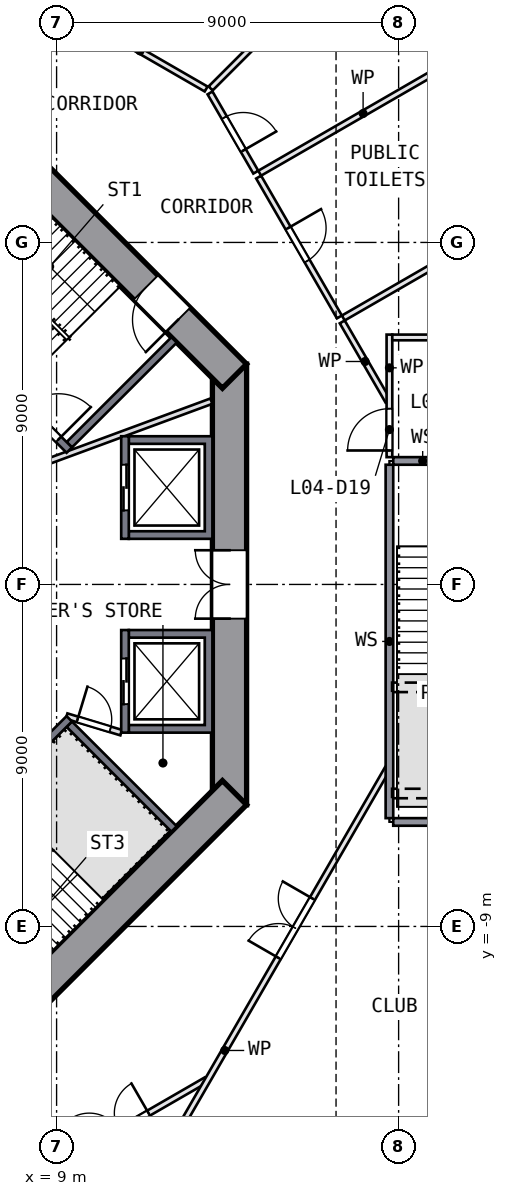
"""IFC4 building model, lengths in metres.
Left out: names, types, materials, properties, quantities, classifications, styles, units other than length and angle.
Written with IfcOpenShell. Run it as: python <this file> out.ifc"""

import sys

from ifc_helpers import new_model, si_unit, direction, frame, frame_2d, origin, place, context, subcontext, project, spatial, polyline, rectangle, outline, extrude, element, fill, save


model = new_model("IFC4")
c1 = context("Model", 3, precision=1e-05, world=origin(), true_north=direction((0.0, 1.0)))
c2 = subcontext(c1, "Body", "Model", "MODEL_VIEW")
j1 = project(units=[si_unit("LENGTHUNIT", "METRE"), si_unit("PLANEANGLEUNIT", "RADIAN")], contexts=[c1])
p1 = place(None, origin())
s1 = spatial("IfcSite", under=j1, at=p1, CompositionType="ELEMENT")
p2 = place(p1, origin())
s2 = spatial("IfcBuilding", under=s1, at=p2, CompositionType="ELEMENT")
p3 = place(p2, frame((0.0, 0.0, 23.5)))
s3 = spatial("IfcBuildingStorey", under=s2, at=p3, CompositionType="ELEMENT", Elevation=23.5)
p4 = place(p3, frame((13.55, -5.799, 0.0), z_axis=(0.0, 0.0, 1.0), x_axis=(0.0, 1.0, 0.0)))
e1 = element("IfcWall", 1, at=p4, inside=s3, PredefinedType="SHEAR", context=c2, shape_type="SweptSolid", body=[
    extrude(rectangle(XDim=11.598, YDim=0.9, at=frame_2d((5.799, 0.0))), origin(), (0.0, 0.0, 1.0), 4.5),
])
p5 = place(p4, frame((4.899, 0.0, 0.0)))
e2 = element("IfcOpeningElement", 2, at=p5, cuts=e1, PredefinedType="OPENING", context=c2, shape_type="SweptSolid", body=[
    extrude(rectangle(XDim=1.8, YDim=2.1, at=frame_2d((0.9, 1.05))), frame((0.0, 0.46, 0.0), z_axis=(0.0, -1.0, 0.0), x_axis=(1.0, 0.0, 0.0)), (0.0, 0.0, 1.0), 0.92),
])
p6 = place(p3, frame((13.682, 5.481, 0.0), z_axis=(0.0, 0.0, 1.0), x_axis=(-0.707106781, 0.707106781, 0.0)))
e3 = element("IfcWall", 3, at=p6, inside=s3, PredefinedType="SHEAR", context=c2, shape_type="SweptSolid", body=[
    extrude(rectangle(XDim=11.598, YDim=0.9, at=frame_2d((5.799, 0.0))), origin(), (0.0, 0.0, 1.0), 4.5),
])
p7 = place(p6, frame((2.099, 0.0, 0.0)))
e4 = element("IfcOpeningElement", 4, at=p7, cuts=e3, PredefinedType="OPENING", context=c2, shape_type="SweptSolid", body=[
    extrude(rectangle(XDim=1.2, YDim=2.1, at=frame_2d((0.6, 1.05))), frame((0.0, 0.46, 0.0), z_axis=(0.0, -1.0, 0.0), x_axis=(1.0, 0.0, 0.0)), (0.0, 0.0, 1.0), 0.92),
])
p8 = place(p3, frame((5.481, -13.682, 0.0), z_axis=(0.0, 0.0, 1.0), x_axis=(0.707106781, 0.707106781, 0.0)))
e5 = element("IfcWall", 5, at=p8, inside=s3, PredefinedType="SHEAR", context=c2, shape_type="SweptSolid", body=[
    extrude(rectangle(XDim=11.598, YDim=0.9, at=frame_2d((5.799, 0.0))), origin(), (0.0, 0.0, 1.0), 4.5),
])
p9 = place(p8, frame((2.099, 0.0, 0.0)))
e6 = element("IfcOpeningElement", 6, at=p9, cuts=e5, PredefinedType="OPENING", context=c2, shape_type="SweptSolid", body=[
    extrude(rectangle(XDim=1.2, YDim=2.1, at=frame_2d((0.6, 1.05))), frame((0.0, 0.46, 0.0), z_axis=(0.0, -1.0, 0.0), x_axis=(1.0, 0.0, 0.0)), (0.0, 0.0, 1.0), 0.92),
])
p10 = place(p3, frame((24.118, 6.603, 0.0), z_axis=(0.0, 0.0, 1.0), x_axis=(-0.499997984, 0.866026568, 0.0)))
e7 = element("IfcWall", 7, at=p10, inside=s3, PredefinedType="SOLIDWALL", context=c2, shape_type="SweptSolid", body=[
    extrude(rectangle(XDim=12.962, YDim=0.14, at=frame_2d((6.481, 0.0))), origin(), (0.0, 0.0, 1.0), 4.0),
])
p11 = place(p3, origin())
e8 = element("IfcWall", 8, at=p11, inside=s3, PredefinedType="SOLIDWALL", context=c2, shape_type="SweptSolid", body=[
    extrude(outline(polyline([(13.1, -3.9), (10.9, -3.9), (10.9, -3.7), (12.9, -3.7), (12.9, -1.4), (10.9, -1.4), (10.9, -1.2), (13.1, -1.2), (13.1, -3.9)])), origin(), (0.0, 0.0, 1.0), 4.0),
])
p12 = place(p3, frame((10.8, -1.2, 0.0), z_axis=(0.0, 0.0, 1.0), x_axis=(0.0, -1.0, 0.0)))
e9 = element("IfcWall", 9, at=p12, inside=s3, PredefinedType="SOLIDWALL", context=c2, shape_type="SweptSolid", body=[
    extrude(rectangle(XDim=2.7, YDim=0.2, at=frame_2d((1.35, 0.0))), origin(), (0.0, 0.0, 1.0), 4.0),
])
p13 = place(p12, frame((0.75, 0.0, 0.0)))
e10 = element("IfcOpeningElement", 10, at=p13, cuts=e9, PredefinedType="OPENING", context=c2, shape_type="SweptSolid", body=[
    extrude(rectangle(XDim=1.2, YDim=2.1, at=frame_2d((0.6, 1.05))), frame((0.0, 0.11, 0.0), z_axis=(0.0, -1.0, 0.0), x_axis=(1.0, 0.0, 0.0)), (0.0, 0.0, 1.0), 0.22),
])
p14 = place(p3, origin())
e11 = element("IfcWall", 11, at=p14, inside=s3, PredefinedType="SOLIDWALL", context=c2, shape_type="SweptSolid", body=[
    extrude(outline(polyline([(13.1, 3.9), (13.1, 1.2), (10.9, 1.2), (10.9, 1.4), (12.9, 1.4), (12.9, 3.7), (10.9, 3.7), (10.9, 3.9), (13.1, 3.9)])), origin(), (0.0, 0.0, 1.0), 4.0),
])
p15 = place(p3, frame((10.8, 1.2, 0.0), z_axis=(0.0, 0.0, 1.0), x_axis=(0.0, 1.0, 0.0)))
e12 = element("IfcWall", 12, at=p15, inside=s3, PredefinedType="SOLIDWALL", context=c2, shape_type="SweptSolid", body=[
    extrude(rectangle(XDim=2.7, YDim=0.2, at=frame_2d((1.35, 0.0))), origin(), (0.0, 0.0, 1.0), 4.0),
])
p16 = place(p15, frame((0.75, 0.0, 0.0)))
e13 = element("IfcOpeningElement", 13, at=p16, cuts=e12, PredefinedType="OPENING", context=c2, shape_type="SweptSolid", body=[
    extrude(rectangle(XDim=1.2, YDim=2.1, at=frame_2d((0.6, 1.05))), frame((0.0, 0.11, 0.0), z_axis=(0.0, -1.0, 0.0), x_axis=(1.0, 0.0, 0.0)), (0.0, 0.0, 1.0), 0.22),
])
p17 = place(p3, frame((3.535, 9.334, 0.0), z_axis=(0.0, 0.0, 1.0), x_axis=(0.707106781, -0.707106781, 0.0)))
e14 = element("IfcWall", 14, at=p17, inside=s3, PredefinedType="SOLIDWALL", context=c2, shape_type="SweptSolid", body=[
    extrude(rectangle(XDim=8.2, YDim=0.2, at=frame_2d((4.1, 0.0))), origin(), (0.0, 0.0, 1.0), 4.0),
])
p18 = place(p17, frame((6.6, 0.0, 0.0)))
e15 = element("IfcOpeningElement", 15, at=p18, cuts=e14, PredefinedType="OPENING", context=c2, shape_type="SweptSolid", body=[
    extrude(rectangle(XDim=1.2, YDim=2.1, at=frame_2d((0.6, 1.05))), frame((0.0, 0.11, 0.0), z_axis=(0.0, -1.0, 0.0), x_axis=(1.0, 0.0, 0.0)), (0.0, 0.0, 1.0), 0.22),
])
p19 = place(p3, frame((9.334, 3.677, 0.0), z_axis=(0.0, 0.0, 1.0), x_axis=(0.707106781, 0.707106781, 0.0)))
e16 = element("IfcWall", 16, at=p19, inside=s3, PredefinedType="SOLIDWALL", context=c2, shape_type="SweptSolid", body=[
    extrude(rectangle(XDim=3.9, YDim=0.2, at=frame_2d((1.95, 0.0))), origin(), (0.0, 0.0, 1.0), 4.0),
])
p20 = place(p3, frame((9.334, -3.535, 0.0), z_axis=(0.0, 0.0, 1.0), x_axis=(-0.707106781, -0.707106781, 0.0)))
e17 = element("IfcWall", 17, at=p20, inside=s3, PredefinedType="SOLIDWALL", context=c2, shape_type="SweptSolid", body=[
    extrude(rectangle(XDim=8.2, YDim=0.2, at=frame_2d((4.1, 0.0))), origin(), (0.0, 0.0, 1.0), 4.0),
])
p21 = place(p20, frame((6.6, 0.0, 0.0)))
e18 = element("IfcOpeningElement", 18, at=p21, cuts=e17, PredefinedType="OPENING", context=c2, shape_type="SweptSolid", body=[
    extrude(rectangle(XDim=1.2, YDim=2.1, at=frame_2d((0.6, 1.05))), frame((0.0, 0.11, 0.0), z_axis=(0.0, -1.0, 0.0), x_axis=(1.0, 0.0, 0.0)), (0.0, 0.0, 1.0), 0.22),
])
p22 = place(p3, frame((9.334, -3.677, 0.0), z_axis=(0.0, 0.0, 1.0), x_axis=(0.707106781, -0.707106781, 0.0)))
e19 = element("IfcWall", 19, at=p22, inside=s3, PredefinedType="SOLIDWALL", context=c2, shape_type="SweptSolid", body=[
    extrude(rectangle(XDim=3.9, YDim=0.2, at=frame_2d((1.95, 0.0))), origin(), (0.0, 0.0, 1.0), 4.0),
])
p23 = place(p3, frame((9.263, -3.465, 0.0), z_axis=(0.0, 0.0, 1.0), x_axis=(0.957084567, -0.289808785, 0.0)))
e20 = element("IfcWall", 20, at=p23, inside=s3, PredefinedType="PARTITIONING", context=c2, shape_type="SweptSolid", body=[
    extrude(rectangle(XDim=1.501, YDim=0.15, at=frame_2d((0.75, 0.0))), origin(), (0.0, 0.0, 1.0), 4.0),
])
p24 = place(p23, frame((0.301, 0.0, 0.0)))
e21 = element("IfcOpeningElement", 21, at=p24, cuts=e20, PredefinedType="OPENING", context=c2, shape_type="SweptSolid", body=[
    extrude(rectangle(XDim=0.9, YDim=2.1, at=frame_2d((0.45, 1.05))), frame((0.0, 0.085, 0.0), z_axis=(0.0, -1.0, 0.0), x_axis=(1.0, 0.0, 0.0)), (0.0, 0.0, 1.0), 0.17),
])
p25 = place(p3, frame((4.813, 1.776, 0.0), z_axis=(0.0, 0.0, 1.0), x_axis=(0.93819293, 0.346112737, 0.0)))
e22 = element("IfcWall", 22, at=p25, inside=s3, PredefinedType="PARTITIONING", context=c2, shape_type="SweptSolid", body=[
    extrude(rectangle(XDim=8.803, YDim=0.15, at=frame_2d((4.402, 0.0))), origin(), (0.0, 0.0, 1.0), 4.0),
])
p26 = place(p25, frame((1.4, 0.0, 0.0)))
e23 = element("IfcOpeningElement", 23, at=p26, cuts=e22, PredefinedType="OPENING", context=c2, shape_type="SweptSolid", body=[
    extrude(rectangle(XDim=1.8, YDim=2.1, at=frame_2d((0.9, 1.05))), frame((0.0, 0.085, 0.0), z_axis=(0.0, -1.0, 0.0), x_axis=(1.0, 0.0, 0.0)), (0.0, 0.0, 1.0), 0.17),
])
p27 = place(p3, frame((4.823, 17.721, 0.0), z_axis=(0.0, 0.0, 1.0), x_axis=(0.866037142, -0.499979668, 0.0)))
e24 = element("IfcWall", 24, at=p27, inside=s3, PredefinedType="PARTITIONING", context=c2, shape_type="SweptSolid", body=[
    extrude(rectangle(XDim=9.367, YDim=0.15, at=frame_2d((4.683, 0.0))), origin(), (0.0, 0.0, 1.0), 4.0),
])
p28 = place(p27, frame((4.15, 0.0, 0.0)))
e25 = element("IfcOpeningElement", 25, at=p28, cuts=e24, PredefinedType="OPENING", context=c2, shape_type="SweptSolid", body=[
    extrude(rectangle(XDim=1.0, YDim=2.1, at=frame_2d((0.5, 1.05))), frame((0.0, 0.085, 0.0), z_axis=(0.0, -1.0, 0.0), x_axis=(1.0, 0.0, 0.0)), (0.0, 0.0, 1.0), 0.17),
])
p29 = place(p3, frame((4.823, -17.721, 0.0), z_axis=(0.0, 0.0, 1.0), x_axis=(0.866037142, 0.499979668, 0.0)))
e26 = element("IfcWall", 26, at=p29, inside=s3, PredefinedType="PARTITIONING", context=c2, shape_type="SweptSolid", body=[
    extrude(rectangle(XDim=9.367, YDim=0.15, at=frame_2d((4.683, 0.0))), origin(), (0.0, 0.0, 1.0), 4.0),
])
p30 = place(p29, frame((5.817, 0.0, 0.0)))
e27 = element("IfcOpeningElement", 27, at=p30, cuts=e26, PredefinedType="OPENING", context=c2, shape_type="SweptSolid", body=[
    extrude(rectangle(XDim=1.8, YDim=2.1, at=frame_2d((0.9, 1.05))), frame((0.0, 0.085, 0.0), z_axis=(0.0, -1.0, 0.0), x_axis=(1.0, 0.0, 0.0)), (0.0, 0.0, 1.0), 0.17),
])
p31 = place(p3, frame((13.038, 12.935, 0.0), z_axis=(0.0, 0.0, 1.0), x_axis=(0.499933044, -0.866064057, 0.0)))
e28 = element("IfcWall", 28, at=p31, inside=s3, PredefinedType="PARTITIONING", context=c2, shape_type="SweptSolid", body=[
    extrude(rectangle(XDim=2.408, YDim=0.15, at=frame_2d((1.204, 0.0))), origin(), (0.0, 0.0, 1.0), 4.0),
])
p32 = place(p31, frame((0.75, 0.0, 0.0)))
e29 = element("IfcOpeningElement", 29, at=p32, cuts=e28, PredefinedType="OPENING", context=c2, shape_type="SweptSolid", body=[
    extrude(rectangle(XDim=1.0, YDim=2.1, at=frame_2d((0.5, 1.05))), frame((0.0, 0.085, 0.0), z_axis=(0.0, -1.0, 0.0), x_axis=(1.0, 0.0, 0.0)), (0.0, 0.0, 1.0), 0.17),
])
p33 = place(p3, frame((14.317, 10.719, 0.0), z_axis=(0.0, 0.0, 1.0), x_axis=(0.500037366, -0.866003829, 0.0)))
e30 = element("IfcWall", 30, at=p33, inside=s3, PredefinedType="PARTITIONING", context=c2, shape_type="SweptSolid", body=[
    extrude(rectangle(XDim=4.25, YDim=0.15, at=frame_2d((2.125, 0.0))), origin(), (0.0, 0.0, 1.0), 4.0),
])
p34 = place(p33, frame((1.55, 0.0, 0.0)))
e31 = element("IfcOpeningElement", 31, at=p34, cuts=e30, PredefinedType="OPENING", context=c2, shape_type="SweptSolid", body=[
    extrude(rectangle(XDim=1.0, YDim=2.1, at=frame_2d((0.5, 1.05))), frame((0.0, 0.085, 0.0), z_axis=(0.0, -1.0, 0.0), x_axis=(1.0, 0.0, 0.0)), (0.0, 0.0, 1.0), 0.17),
])
p35 = place(p3, frame((16.517, 6.909, 0.0), z_axis=(0.0, 0.0, 1.0), x_axis=(0.499933044, -0.866064057, 0.0)))
e32 = element("IfcWall", 32, at=p35, inside=s3, PredefinedType="PARTITIONING", context=c2, shape_type="SweptSolid", body=[
    extrude(rectangle(XDim=2.408, YDim=0.15, at=frame_2d((1.204, 0.0))), origin(), (0.0, 0.0, 1.0), 4.0),
])
p36 = place(p3, frame((17.858, -6.25, 0.0), z_axis=(0.0, 0.0, 1.0), x_axis=(1.0, 0.0, 0.0)))
e33 = element("IfcWall", 33, at=p36, inside=s3, PredefinedType="SOLIDWALL", context=c2, shape_type="SweptSolid", body=[
    extrude(rectangle(XDim=4.6, YDim=0.2, at=frame_2d((2.3, 0.0))), origin(), (0.0, 0.0, 1.0), 4.0),
])
p37 = place(p3, frame((12.117, -14.53, 0.0), z_axis=(0.0, 0.0, 1.0), x_axis=(0.500001509, 0.866024532, 0.0)))
e34 = element("IfcWall", 34, at=p37, inside=s3, PredefinedType="PARTITIONING", context=c2, shape_type="SweptSolid", body=[
    extrude(rectangle(XDim=11.183, YDim=0.15, at=frame_2d((5.592, 0.0))), origin(), (0.0, 0.0, 1.0), 4.0),
])
p38 = place(p37, frame((5.433, 0.0, 0.0)))
e35 = element("IfcOpeningElement", 35, at=p38, cuts=e34, PredefinedType="OPENING", context=c2, shape_type="SweptSolid", body=[
    extrude(rectangle(XDim=1.8, YDim=2.1, at=frame_2d((0.9, 1.05))), frame((0.0, 0.085, 0.0), z_axis=(0.0, -1.0, 0.0), x_axis=(1.0, 0.0, 0.0)), (0.0, 0.0, 1.0), 0.17),
])
p39 = place(p3, frame((17.758, 3.15, 0.0), z_axis=(0.0, 0.0, 1.0), x_axis=(0.0, -1.0, 0.0)))
e36 = element("IfcWall", 36, at=p39, inside=s3, PredefinedType="SOLIDWALL", context=c2, shape_type="SweptSolid", body=[
    extrude(rectangle(XDim=9.3, YDim=0.2, at=frame_2d((4.65, 0.0))), origin(), (0.0, 0.0, 1.0), 4.0),
])
p40 = place(p3, frame((17.758, 3.35, 0.0), z_axis=(0.0, 0.0, 1.0), x_axis=(0.0, 1.0, 0.0)))
e37 = element("IfcWall", 37, at=p40, inside=s3, PredefinedType="PARTITIONING", context=c2, shape_type="SweptSolid", body=[
    extrude(rectangle(XDim=3.225, YDim=0.15, at=frame_2d((1.613, 0.0))), origin(), (0.0, 0.0, 1.0), 4.0),
])
p41 = place(p40, frame((0.175, 0.0, 0.0)))
e38 = element("IfcOpeningElement", 38, at=p41, cuts=e37, PredefinedType="OPENING", context=c2, shape_type="SweptSolid", body=[
    extrude(rectangle(XDim=1.1, YDim=2.1, at=frame_2d((0.55, 1.05))), frame((0.0, 0.085, 0.0), z_axis=(0.0, -1.0, 0.0), x_axis=(1.0, 0.0, 0.0)), (0.0, 0.0, 1.0), 0.17),
])
p42 = place(p3, frame((17.7, 17.7, 0.0), z_axis=(0.0, 0.0, 1.0), x_axis=(-0.707106781, -0.707106781, 0.0)))
e39 = element("IfcWall", 39, at=p42, inside=s3, PredefinedType="PARTITIONING", context=c2, shape_type="SweptSolid", body=[
    extrude(rectangle(XDim=6.572, YDim=0.15, at=frame_2d((3.286, 0.0))), origin(), (0.0, 0.0, 1.0), 4.0),
])
p43 = place(p3, frame((19.787, 13.964, 0.0), z_axis=(0.0, 0.0, 1.0), x_axis=(-0.866042631, -0.49997016, 0.0)))
e40 = element("IfcWall", 40, at=p43, inside=s3, PredefinedType="PARTITIONING", context=c2, shape_type="SweptSolid", body=[
    extrude(rectangle(XDim=6.285, YDim=0.15, at=frame_2d((3.143, 0.0))), origin(), (0.0, 0.0, 1.0), 4.0),
])
p44 = place(p3, frame((21.987, 10.154, 0.0), z_axis=(0.0, 0.0, 1.0), x_axis=(-0.866032921, -0.49998698, 0.0)))
e41 = element("IfcWall", 41, at=p44, inside=s3, PredefinedType="PARTITIONING", context=c2, shape_type="SweptSolid", body=[
    extrude(rectangle(XDim=6.285, YDim=0.15, at=frame_2d((3.143, 0.0))), origin(), (0.0, 0.0, 1.0), 4.0),
])
p45 = place(p3, frame((17.858, 3.25, 0.0), z_axis=(0.0, 0.0, 1.0), x_axis=(1.0, 0.0, 0.0)))
e42 = element("IfcWall", 42, at=p45, inside=s3, PredefinedType="SOLIDWALL", context=c2, shape_type="SweptSolid", body=[
    extrude(rectangle(XDim=4.6, YDim=0.2, at=frame_2d((2.3, 0.0))), origin(), (0.0, 0.0, 1.0), 4.0),
])
p46 = place(p45, frame((1.75, 0.0, 0.0)))
e43 = element("IfcOpeningElement", 43, at=p46, cuts=e42, PredefinedType="OPENING", context=c2, shape_type="SweptSolid", body=[
    extrude(rectangle(XDim=1.1, YDim=2.1, at=frame_2d((0.55, 1.05))), frame((0.0, 0.11, 0.0), z_axis=(0.0, -1.0, 0.0), x_axis=(1.0, 0.0, 0.0)), (0.0, 0.0, 1.0), 0.22),
])
p47 = place(p3, frame((24.118, 6.5, 0.0), z_axis=(0.0, 0.0, 1.0), x_axis=(-1.0, 0.0, 0.0)))
e44 = element("IfcWall", 44, at=p47, inside=s3, PredefinedType="PARTITIONING", context=c2, shape_type="SweptSolid", body=[
    extrude(rectangle(XDim=6.285, YDim=0.15, at=frame_2d((3.143, 0.0))), origin(), (0.0, 0.0, 1.0), 4.0),
])
p48 = place(p47, frame((2.55, 0.0, 0.0)))
e45 = element("IfcOpeningElement", 45, at=p48, cuts=e44, PredefinedType="OPENING", context=c2, shape_type="SweptSolid", body=[
    extrude(rectangle(XDim=1.0, YDim=2.1, at=frame_2d((0.5, 1.05))), frame((0.0, 0.085, 0.0), z_axis=(0.0, -1.0, 0.0), x_axis=(1.0, 0.0, 0.0)), (0.0, 0.0, 1.0), 0.17),
])
p49 = place(p47, frame((3.95, 0.0, 0.0)))
e46 = element("IfcOpeningElement", 46, at=p49, cuts=e44, PredefinedType="OPENING", context=c2, shape_type="SweptSolid", body=[
    extrude(rectangle(XDim=1.0, YDim=2.1, at=frame_2d((0.5, 1.05))), frame((0.0, 0.085, 0.0), z_axis=(0.0, -1.0, 0.0), x_axis=(1.0, 0.0, 0.0)), (0.0, 0.0, 1.0), 0.17),
])
p50 = place(p13, origin())
e47 = element("IfcDoor", 47, at=p50, inside=s3, OperationType="DOUBLE_DOOR_SLIDING", PredefinedType="DOOR", context=c2, shape_type="SweptSolid", body=[
    extrude(rectangle(XDim=1.2, YDim=2.1, at=frame_2d((0.6, 1.05))), frame((0.0, 0.025, 0.0), z_axis=(0.0, -1.0, 0.0), x_axis=(1.0, 0.0, 0.0)), (0.0, 0.0, 1.0), 0.05),
])
fill(e10, e47)
p51 = place(p16, origin())
e48 = element("IfcDoor", 48, at=p51, inside=s3, OperationType="DOUBLE_DOOR_SLIDING", PredefinedType="DOOR", context=c2, shape_type="SweptSolid", body=[
    extrude(rectangle(XDim=1.2, YDim=2.1, at=frame_2d((0.6, 1.05))), frame((0.0, 0.025, 0.0), z_axis=(0.0, -1.0, 0.0), x_axis=(1.0, 0.0, 0.0)), (0.0, 0.0, 1.0), 0.05),
])
fill(e13, e48)
p52 = place(p18, origin())
e49 = element("IfcDoor", 49, at=p52, inside=s3, OperationType="SINGLE_SWING_RIGHT", PredefinedType="DOOR", context=c2, shape_type="SweptSolid", body=[
    extrude(rectangle(XDim=1.2, YDim=2.1, at=frame_2d((0.6, 1.05))), frame((0.0, 0.025, 0.0), z_axis=(0.0, -1.0, 0.0), x_axis=(1.0, 0.0, 0.0)), (0.0, 0.0, 1.0), 0.05),
])
fill(e15, e49)
p53 = place(p5, origin())
e50 = element("IfcDoor", 50, at=p53, inside=s3, OperationType="DOUBLE_DOOR_SINGLE_SWING", PredefinedType="DOOR", context=c2, shape_type="SweptSolid", body=[
    extrude(rectangle(XDim=1.8, YDim=2.1, at=frame_2d((0.9, 1.05))), frame((0.0, 0.025, 0.0), z_axis=(0.0, -1.0, 0.0), x_axis=(1.0, 0.0, 0.0)), (0.0, 0.0, 1.0), 0.05),
])
fill(e2, e50)
p54 = place(p7, origin())
e51 = element("IfcDoor", 51, at=p54, inside=s3, OperationType="SINGLE_SWING_LEFT", PredefinedType="DOOR", context=c2, shape_type="SweptSolid", body=[
    extrude(rectangle(XDim=1.2, YDim=2.1, at=frame_2d((0.6, 1.05))), frame((0.0, 0.025, 0.0), z_axis=(0.0, -1.0, 0.0), x_axis=(1.0, 0.0, 0.0)), (0.0, 0.0, 1.0), 0.05),
])
fill(e4, e51)
p55 = place(p24, origin())
e52 = element("IfcDoor", 52, at=p55, inside=s3, OperationType="SINGLE_SWING_LEFT", PredefinedType="DOOR", context=c2, shape_type="SweptSolid", body=[
    extrude(rectangle(XDim=0.9, YDim=2.1, at=frame_2d((0.45, 1.05))), frame((0.0, 0.025, 0.0), z_axis=(0.0, -1.0, 0.0), x_axis=(1.0, 0.0, 0.0)), (0.0, 0.0, 1.0), 0.05),
])
fill(e21, e52)
p56 = place(p30, origin())
e53 = element("IfcDoor", 53, at=p56, inside=s3, OperationType="DOUBLE_DOOR_SINGLE_SWING", PredefinedType="DOOR", context=c2, shape_type="SweptSolid", body=[
    extrude(rectangle(XDim=1.8, YDim=2.1, at=frame_2d((0.9, 1.05))), frame((0.0, 0.025, 0.0), z_axis=(0.0, -1.0, 0.0), x_axis=(1.0, 0.0, 0.0)), (0.0, 0.0, 1.0), 0.05),
])
fill(e27, e53)
p57 = place(p32, origin())
e54 = element("IfcDoor", 54, at=p57, inside=s3, OperationType="SINGLE_SWING_RIGHT", PredefinedType="DOOR", context=c2, shape_type="SweptSolid", body=[
    extrude(rectangle(XDim=1.0, YDim=2.1, at=frame_2d((0.5, 1.05))), frame((0.0, 0.025, 0.0), z_axis=(0.0, -1.0, 0.0), x_axis=(1.0, 0.0, 0.0)), (0.0, 0.0, 1.0), 0.05),
])
fill(e29, e54)
p58 = place(p34, origin())
e55 = element("IfcDoor", 55, at=p58, inside=s3, OperationType="SINGLE_SWING_LEFT", PredefinedType="DOOR", context=c2, shape_type="SweptSolid", body=[
    extrude(rectangle(XDim=1.0, YDim=2.1, at=frame_2d((0.5, 1.05))), frame((0.0, 0.025, 0.0), z_axis=(0.0, -1.0, 0.0), x_axis=(1.0, 0.0, 0.0)), (0.0, 0.0, 1.0), 0.05),
])
fill(e31, e55)
p59 = place(p38, origin())
e56 = element("IfcDoor", 56, at=p59, inside=s3, OperationType="DOUBLE_DOOR_SINGLE_SWING", PredefinedType="DOOR", context=c2, shape_type="SweptSolid", body=[
    extrude(rectangle(XDim=1.8, YDim=2.1, at=frame_2d((0.9, 1.05))), frame((0.0, 0.025, 0.0), z_axis=(0.0, -1.0, 0.0), x_axis=(1.0, 0.0, 0.0)), (0.0, 0.0, 1.0), 0.05),
])
fill(e35, e56)
p60 = place(p41, origin())
e57 = element("IfcDoor", 57, at=p60, inside=s3, OperationType="SINGLE_SWING_LEFT", PredefinedType="DOOR", context=c2, shape_type="SweptSolid", body=[
    extrude(rectangle(XDim=1.1, YDim=2.1, at=frame_2d((0.55, 1.05))), frame((0.0, 0.025, 0.0), z_axis=(0.0, -1.0, 0.0), x_axis=(1.0, 0.0, 0.0)), (0.0, 0.0, 1.0), 0.05),
])
fill(e38, e57)
save(model, sys.argv[1])
